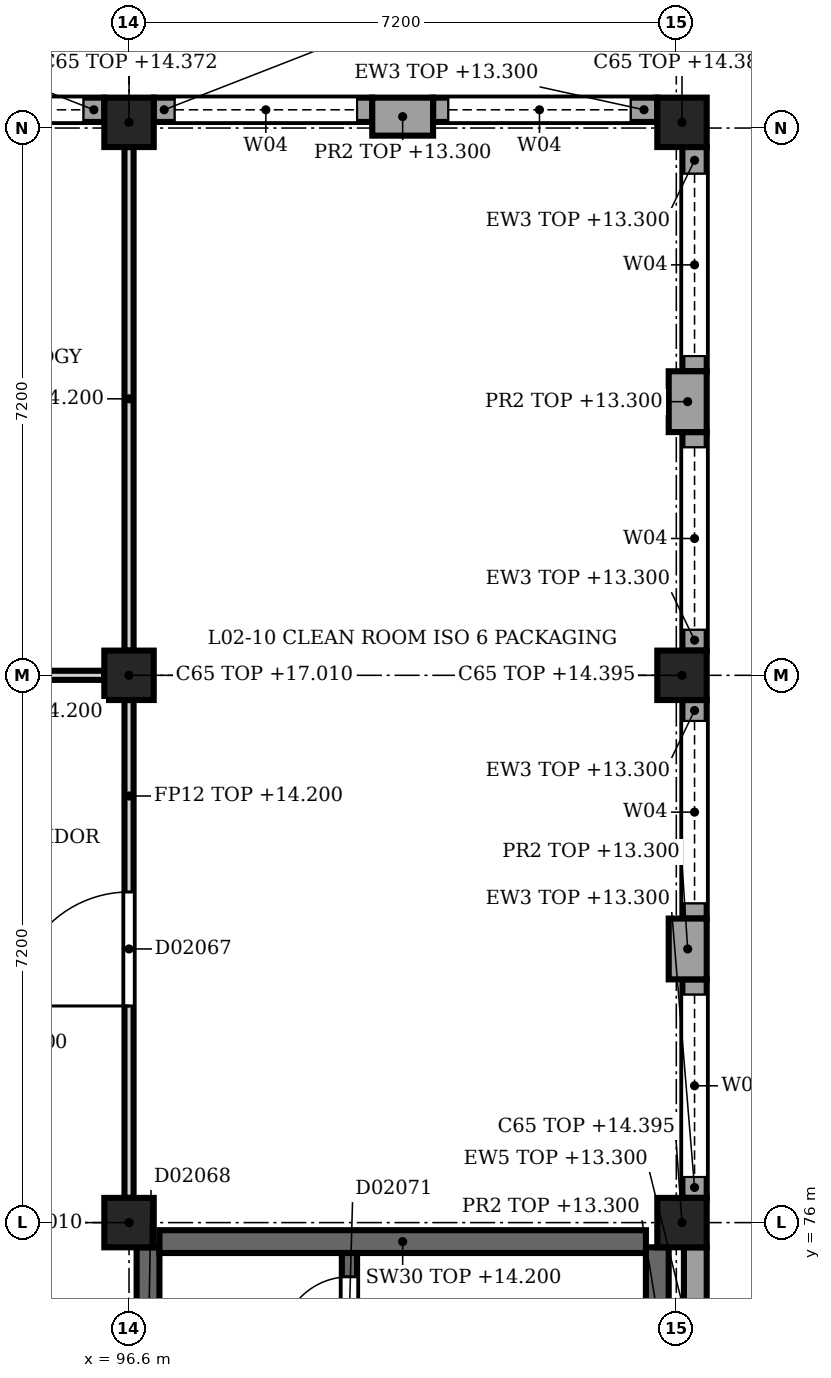
"""IFC4 building model, lengths in metres.
Left out: names, types, materials, properties, quantities, classifications, styles, units other than length and angle.
Written with IfcOpenShell. Run it as: python <this file> out.ifc"""

import sys

from ifc_helpers import new_model, si_unit, direction, frame, frame_2d, origin, origin_2d, place, context, subcontext, project, spatial, rectangle, extrude, element, fill, save


model = new_model("IFC4")
c1 = context("Model", 3, precision=1e-05, world=origin(), true_north=direction((0.0, 1.0)))
c2 = subcontext(c1, "Body", "Model", "MODEL_VIEW")
j1 = project(units=[si_unit("LENGTHUNIT", "METRE"), si_unit("PLANEANGLEUNIT", "RADIAN")], contexts=[c1])
p1 = place(None, origin())
s1 = spatial("IfcSite", under=j1, at=p1, CompositionType="ELEMENT")
p2 = place(p1, origin())
s2 = spatial("IfcBuilding", under=s1, at=p2, CompositionType="ELEMENT")
p3 = place(p2, frame((0.0, 0.0, 9.9)))
s3 = spatial("IfcBuildingStorey", under=s2, at=p3, CompositionType="ELEMENT", Elevation=9.9)
for number, where, z_axis, x_axis in (
    (1, (96.6, 76.0, 0.0), (0.0, 0.0, 1.0), (1.0, 0.0, 0.0)),
    (2, (96.6, 83.2, 0.0), (0.0, 0.0, 1.0), (1.0, 0.0, 0.0)),
):
    element("IfcColumn", number, at=place(p3, frame(where, z_axis=z_axis, x_axis=x_axis)), inside=s3, PredefinedType="COLUMN", context=c2, shape_type="SweptSolid", body=[
        extrude(rectangle(XDim=0.65, YDim=0.65, at=origin_2d()), origin(), (0.0, 0.0, 1.0), 7.11),
    ])
p4 = place(p3, frame((96.6, 90.475, 0.0), z_axis=(0.0, 0.0, 1.0), x_axis=(1.0, 0.0, 0.0)))
e3 = element("IfcColumn", 3, at=p4, inside=s3, PredefinedType="COLUMN", context=c2, shape_type="SweptSolid", body=[
    extrude(rectangle(XDim=0.65, YDim=0.65, at=origin_2d()), origin(), (0.0, 0.0, 1.0), 4.472),
])
for number, where, z_axis, x_axis in (
    (4, (103.875, 76.0, 0.0), (0.0, 0.0, 1.0), (1.0, 0.0, 0.0)),
    (5, (103.875, 83.2, 0.0), (0.0, 0.0, 1.0), (1.0, 0.0, 0.0)),
):
    element("IfcColumn", number, at=place(p3, frame(where, z_axis=z_axis, x_axis=x_axis)), inside=s3, PredefinedType="COLUMN", context=c2, shape_type="SweptSolid", body=[
        extrude(rectangle(XDim=0.65, YDim=0.65, at=origin_2d()), origin(), (0.0, 0.0, 1.0), 4.495),
    ])
p5 = place(p3, frame((103.875, 90.475, 0.0), z_axis=(0.0, 0.0, 1.0), x_axis=(1.0, 0.0, 0.0)))
e6 = element("IfcColumn", 6, at=p5, inside=s3, PredefinedType="COLUMN", context=c2, shape_type="SweptSolid", body=[
    extrude(rectangle(XDim=0.65, YDim=0.65, at=origin_2d()), origin(), (0.0, 0.0, 1.0), 4.49),
])
p6 = place(p3, frame((99.8, 90.55, 0.0), z_axis=(0.0, 0.0, 1.0), x_axis=(1.0, 0.0, 0.0)))
e7 = element("IfcWall", 7, at=p6, inside=s3, PredefinedType="SOLIDWALL", context=c2, shape_type="SweptSolid", body=[
    extrude(rectangle(XDim=0.8, YDim=0.5, at=frame_2d((0.4, 0.0))), origin(), (0.0, 0.0, 1.0), 3.4),
])
p7 = place(p3, frame((93.4, 90.64, 0.0), z_axis=(0.0, 0.0, 1.0), x_axis=(1.0, 0.0, 0.0)))
e8 = element("IfcWall", 8, at=p7, inside=s3, PredefinedType="SOLIDWALL", context=c2, shape_type="SweptSolid", body=[
    extrude(rectangle(XDim=2.875, YDim=0.32, at=frame_2d((1.438, 0.0))), origin(), (0.0, 0.0, 1.0), 3.4),
])
p8 = place(p7, frame((0.2, 0.0, 1.9)))
e9 = element("IfcOpeningElement", 9, at=p8, cuts=e8, PredefinedType="OPENING", context=c2, shape_type="SweptSolid", body=[
    extrude(rectangle(XDim=2.4, YDim=1.2, at=frame_2d((1.2, 0.6))), frame((0.0, 0.17, 0.0), z_axis=(0.0, -1.0, 0.0), x_axis=(1.0, 0.0, 0.0)), (0.0, 0.0, 1.0), 0.34),
])
p9 = place(p3, frame((96.925, 90.64, 0.0), z_axis=(0.0, 0.0, 1.0), x_axis=(1.0, 0.0, 0.0)))
e10 = element("IfcWall", 10, at=p9, inside=s3, PredefinedType="SOLIDWALL", context=c2, shape_type="SweptSolid", body=[
    extrude(rectangle(XDim=2.875, YDim=0.32, at=frame_2d((1.438, 0.0))), origin(), (0.0, 0.0, 1.0), 3.4),
])
p10 = place(p9, frame((0.275, 0.0, 1.9)))
e11 = element("IfcOpeningElement", 11, at=p10, cuts=e10, PredefinedType="OPENING", context=c2, shape_type="SweptSolid", body=[
    extrude(rectangle(XDim=2.4, YDim=1.2, at=frame_2d((1.2, 0.6))), frame((0.0, 0.17, 0.0), z_axis=(0.0, -1.0, 0.0), x_axis=(1.0, 0.0, 0.0)), (0.0, 0.0, 1.0), 0.34),
])
p11 = place(p3, frame((100.6, 90.64, 0.0), z_axis=(0.0, 0.0, 1.0), x_axis=(1.0, 0.0, 0.0)))
e12 = element("IfcWall", 12, at=p11, inside=s3, PredefinedType="SOLIDWALL", context=c2, shape_type="SweptSolid", body=[
    extrude(rectangle(XDim=2.95, YDim=0.32, at=frame_2d((1.475, 0.0))), origin(), (0.0, 0.0, 1.0), 3.4),
])
p12 = place(p11, frame((0.2, 0.0, 1.9)))
e13 = element("IfcOpeningElement", 13, at=p12, cuts=e12, PredefinedType="OPENING", context=c2, shape_type="SweptSolid", body=[
    extrude(rectangle(XDim=2.4, YDim=1.2, at=frame_2d((1.2, 0.6))), frame((0.0, 0.17, 0.0), z_axis=(0.0, -1.0, 0.0), x_axis=(1.0, 0.0, 0.0)), (0.0, 0.0, 1.0), 0.34),
])
for number, where, z_axis, x_axis in (
    (14, (103.95, 87.2, 0.0), (0.0, 0.0, 1.0), (0.0, -1.0, 0.0)),
    (15, (103.95, 80.0, 0.0), (0.0, 0.0, 1.0), (0.0, -1.0, 0.0)),
):
    element("IfcWall", number, at=place(p3, frame(where, z_axis=z_axis, x_axis=x_axis)), inside=s3, PredefinedType="SOLIDWALL", context=c2, shape_type="SweptSolid", body=[
        extrude(rectangle(XDim=0.8, YDim=0.5, at=frame_2d((0.4, 0.0))), origin(), (0.0, 0.0, 1.0), 3.4),
    ])
p13 = place(p3, frame((104.04, 90.15, 0.0), z_axis=(0.0, 0.0, 1.0), x_axis=(0.0, -1.0, 0.0)))
e16 = element("IfcWall", 16, at=p13, inside=s3, PredefinedType="SOLIDWALL", context=c2, shape_type="SweptSolid", body=[
    extrude(rectangle(XDim=2.95, YDim=0.32, at=frame_2d((1.475, 0.0))), origin(), (0.0, 0.0, 1.0), 3.4),
])
p14 = place(p13, frame((0.35, 0.0, 1.9)))
e17 = element("IfcOpeningElement", 17, at=p14, cuts=e16, PredefinedType="OPENING", context=c2, shape_type="SweptSolid", body=[
    extrude(rectangle(XDim=2.4, YDim=1.2, at=frame_2d((1.2, 0.6))), frame((0.0, 0.17, 0.0), z_axis=(0.0, -1.0, 0.0), x_axis=(1.0, 0.0, 0.0)), (0.0, 0.0, 1.0), 0.34),
])
p15 = place(p3, frame((104.04, 86.4, 0.0), z_axis=(0.0, 0.0, 1.0), x_axis=(0.0, -1.0, 0.0)))
e18 = element("IfcWall", 18, at=p15, inside=s3, PredefinedType="SOLIDWALL", context=c2, shape_type="SweptSolid", body=[
    extrude(rectangle(XDim=2.875, YDim=0.32, at=frame_2d((1.438, 0.0))), origin(), (0.0, 0.0, 1.0), 3.4),
])
p16 = place(p15, frame((0.2, 0.0, 1.9)))
e19 = element("IfcOpeningElement", 19, at=p16, cuts=e18, PredefinedType="OPENING", context=c2, shape_type="SweptSolid", body=[
    extrude(rectangle(XDim=2.4, YDim=1.2, at=frame_2d((1.2, 0.6))), frame((0.0, 0.17, 0.0), z_axis=(0.0, -1.0, 0.0), x_axis=(1.0, 0.0, 0.0)), (0.0, 0.0, 1.0), 0.34),
])
p17 = place(p3, frame((104.04, 82.875, 0.0), z_axis=(0.0, 0.0, 1.0), x_axis=(0.0, -1.0, 0.0)))
e20 = element("IfcWall", 20, at=p17, inside=s3, PredefinedType="SOLIDWALL", context=c2, shape_type="SweptSolid", body=[
    extrude(rectangle(XDim=2.875, YDim=0.32, at=frame_2d((1.438, 0.0))), origin(), (0.0, 0.0, 1.0), 3.4),
])
p18 = place(p17, frame((0.275, 0.0, 1.9)))
e21 = element("IfcOpeningElement", 21, at=p18, cuts=e20, PredefinedType="OPENING", context=c2, shape_type="SweptSolid", body=[
    extrude(rectangle(XDim=2.4, YDim=1.2, at=frame_2d((1.2, 0.6))), frame((0.0, 0.17, 0.0), z_axis=(0.0, -1.0, 0.0), x_axis=(1.0, 0.0, 0.0)), (0.0, 0.0, 1.0), 0.34),
])
p19 = place(p3, frame((104.04, 79.2, 0.0), z_axis=(0.0, 0.0, 1.0), x_axis=(0.0, -1.0, 0.0)))
e22 = element("IfcWall", 22, at=p19, inside=s3, PredefinedType="SOLIDWALL", context=c2, shape_type="SweptSolid", body=[
    extrude(rectangle(XDim=2.875, YDim=0.32, at=frame_2d((1.438, 0.0))), origin(), (0.0, 0.0, 1.0), 3.4),
])
p20 = place(p19, frame((0.2, 0.0, 1.9)))
e23 = element("IfcOpeningElement", 23, at=p20, cuts=e22, PredefinedType="OPENING", context=c2, shape_type="SweptSolid", body=[
    extrude(rectangle(XDim=2.4, YDim=1.2, at=frame_2d((1.2, 0.6))), frame((0.0, 0.17, 0.0), z_axis=(0.0, -1.0, 0.0), x_axis=(1.0, 0.0, 0.0)), (0.0, 0.0, 1.0), 0.34),
])
p21 = place(p3, frame((104.05, 75.675, 0.0), z_axis=(0.0, 0.0, 1.0), x_axis=(0.0, -1.0, 0.0)))
e24 = element("IfcWall", 24, at=p21, inside=s3, PredefinedType="SOLIDWALL", context=c2, shape_type="SweptSolid", body=[
    extrude(rectangle(XDim=2.875, YDim=0.3, at=frame_2d((1.438, 0.0))), origin(), (0.0, 0.0, 1.0), 3.4),
])
p22 = place(p3, frame((96.85, 75.675, 0.0), z_axis=(0.0, 0.0, 1.0), x_axis=(0.0, -1.0, 0.0)))
e25 = element("IfcWall", 25, at=p22, inside=s3, PredefinedType="SHEAR", context=c2, shape_type="SweptSolid", body=[
    extrude(rectangle(XDim=6.625, YDim=0.3, at=frame_2d((3.312, 0.0))), origin(), (0.0, 0.0, 1.0), 4.3),
])
p23 = place(p22, frame((1.075, 0.0, 0.0)))
e26 = element("IfcOpeningElement", 26, at=p23, cuts=e25, PredefinedType="OPENING", context=c2, shape_type="SweptSolid", body=[
    extrude(rectangle(XDim=1.2, YDim=2.1, at=frame_2d((0.6, 1.05))), frame((0.0, 0.16, 0.0), z_axis=(0.0, -1.0, 0.0), x_axis=(1.0, 0.0, 0.0)), (0.0, 0.0, 1.0), 0.32),
])
p24 = place(p3, frame((103.55, 69.05, 0.0), z_axis=(0.0, 0.0, 1.0), x_axis=(0.0, 1.0, 0.0)))
e27 = element("IfcWall", 27, at=p24, inside=s3, PredefinedType="SHEAR", context=c2, shape_type="SweptSolid", body=[
    extrude(rectangle(XDim=6.625, YDim=0.3, at=frame_2d((3.312, 0.0))), origin(), (0.0, 0.0, 1.0), 4.3),
])
p25 = place(p24, frame((1.25, 0.0, 1.2)))
e28 = element("IfcOpeningElement", 28, at=p25, cuts=e27, PredefinedType="OPENING", context=c2, shape_type="SweptSolid", body=[
    extrude(rectangle(XDim=0.6, YDim=1.8, at=frame_2d((0.3, 0.9))), frame((0.0, 0.16, 0.0), z_axis=(0.0, -1.0, 0.0), x_axis=(1.0, 0.0, 0.0)), (0.0, 0.0, 1.0), 0.32),
])
p26 = place(p3, frame((97.0, 75.75, 0.0), z_axis=(0.0, 0.0, 1.0), x_axis=(1.0, 0.0, 0.0)))
e29 = element("IfcWall", 29, at=p26, inside=s3, PredefinedType="SHEAR", context=c2, shape_type="SweptSolid", body=[
    extrude(rectangle(XDim=6.4, YDim=0.3, at=frame_2d((3.2, 0.0))), origin(), (0.0, 0.0, 1.0), 4.3),
])
p27 = place(p3, frame((99.5, 72.35, 0.0), z_axis=(0.0, 0.0, 1.0), x_axis=(0.0, 1.0, 0.0)))
e30 = element("IfcWall", 30, at=p27, inside=s3, PredefinedType="SHEAR", context=c2, shape_type="SweptSolid", body=[
    extrude(rectangle(XDim=3.25, YDim=0.2, at=frame_2d((1.625, 0.0))), origin(), (0.0, 0.0, 1.0), 4.3),
])
p28 = place(p27, frame((0.312, 0.0, 0.0)))
e31 = element("IfcOpeningElement", 31, at=p28, cuts=e30, PredefinedType="OPENING", context=c2, shape_type="SweptSolid", body=[
    extrude(rectangle(XDim=0.9, YDim=2.1, at=frame_2d((0.45, 1.05))), frame((0.0, 0.11, 0.0), z_axis=(0.0, -1.0, 0.0), x_axis=(1.0, 0.0, 0.0)), (0.0, 0.0, 1.0), 0.22),
])
p29 = place(p27, frame((2.038, 0.0, 0.0)))
e32 = element("IfcOpeningElement", 32, at=p29, cuts=e30, PredefinedType="OPENING", context=c2, shape_type="SweptSolid", body=[
    extrude(rectangle(XDim=0.9, YDim=2.1, at=frame_2d((0.45, 1.05))), frame((0.0, 0.11, 0.0), z_axis=(0.0, -1.0, 0.0), x_axis=(1.0, 0.0, 0.0)), (0.0, 0.0, 1.0), 0.22),
])
p30 = place(p3, frame((89.725, 83.2, 0.0), z_axis=(0.0, 0.0, 1.0), x_axis=(1.0, 0.0, 0.0)))
e33 = element("IfcWall", 33, at=p30, inside=s3, PredefinedType="PARTITIONING", context=c2, shape_type="SweptSolid", body=[
    extrude(rectangle(XDim=6.55, YDim=0.12, at=frame_2d((3.275, 0.0))), origin(), (0.0, 0.0, 1.0), 4.3),
])
p31 = place(p30, frame((2.525, 0.0, 0.0)))
e34 = element("IfcOpeningElement", 34, at=p31, cuts=e33, PredefinedType="OPENING", context=c2, shape_type="SweptSolid", body=[
    extrude(rectangle(XDim=1.5, YDim=2.2, at=frame_2d((0.75, 1.1))), frame((0.0, 0.07, 0.0), z_axis=(0.0, -1.0, 0.0), x_axis=(1.0, 0.0, 0.0)), (0.0, 0.0, 1.0), 0.14),
])
p32 = place(p3, frame((96.6, 82.875, 0.0), z_axis=(0.0, 0.0, 1.0), x_axis=(0.0, -1.0, 0.0)))
e35 = element("IfcWall", 35, at=p32, inside=s3, PredefinedType="PARTITIONING", context=c2, shape_type="SweptSolid", body=[
    extrude(rectangle(XDim=6.55, YDim=0.12, at=frame_2d((3.275, 0.0))), origin(), (0.0, 0.0, 1.0), 4.3),
])
p33 = place(p32, frame((2.525, 0.0, 0.0)))
e36 = element("IfcOpeningElement", 36, at=p33, cuts=e35, PredefinedType="OPENING", context=c2, shape_type="SweptSolid", body=[
    extrude(rectangle(XDim=1.5, YDim=2.2, at=frame_2d((0.75, 1.1))), frame((0.0, 0.07, 0.0), z_axis=(0.0, -1.0, 0.0), x_axis=(1.0, 0.0, 0.0)), (0.0, 0.0, 1.0), 0.14),
])
p34 = place(p3, frame((96.6, 83.525, 0.0), z_axis=(0.0, 0.0, 1.0), x_axis=(0.0, 1.0, 0.0)))
e37 = element("IfcWall", 37, at=p34, inside=s3, PredefinedType="PARTITIONING", context=c2, shape_type="SweptSolid", body=[
    extrude(rectangle(XDim=6.625, YDim=0.12, at=frame_2d((3.312, 0.0))), origin(), (0.0, 0.0, 1.0), 4.3),
])
p35 = place(p8, origin())
e38 = element("IfcWindow", 38, at=p35, inside=s3, PartitioningType="SINGLE_PANEL", PredefinedType="WINDOW", context=c2, shape_type="SweptSolid", body=[
    extrude(rectangle(XDim=2.4, YDim=1.2, at=frame_2d((1.2, 0.6))), frame((0.0, 0.03, 0.0), z_axis=(0.0, -1.0, 0.0), x_axis=(1.0, 0.0, 0.0)), (0.0, 0.0, 1.0), 0.06),
])
fill(e9, e38)
p36 = place(p10, origin())
e39 = element("IfcWindow", 39, at=p36, inside=s3, PartitioningType="SINGLE_PANEL", PredefinedType="WINDOW", context=c2, shape_type="SweptSolid", body=[
    extrude(rectangle(XDim=2.4, YDim=1.2, at=frame_2d((1.2, 0.6))), frame((0.0, 0.03, 0.0), z_axis=(0.0, -1.0, 0.0), x_axis=(1.0, 0.0, 0.0)), (0.0, 0.0, 1.0), 0.06),
])
fill(e11, e39)
p37 = place(p12, origin())
e40 = element("IfcWindow", 40, at=p37, inside=s3, PartitioningType="SINGLE_PANEL", PredefinedType="WINDOW", context=c2, shape_type="SweptSolid", body=[
    extrude(rectangle(XDim=2.4, YDim=1.2, at=frame_2d((1.2, 0.6))), frame((0.0, 0.03, 0.0), z_axis=(0.0, -1.0, 0.0), x_axis=(1.0, 0.0, 0.0)), (0.0, 0.0, 1.0), 0.06),
])
fill(e13, e40)
p38 = place(p14, origin())
e41 = element("IfcWindow", 41, at=p38, inside=s3, PartitioningType="SINGLE_PANEL", PredefinedType="WINDOW", context=c2, shape_type="SweptSolid", body=[
    extrude(rectangle(XDim=2.4, YDim=1.2, at=frame_2d((1.2, 0.6))), frame((0.0, 0.03, 0.0), z_axis=(0.0, -1.0, 0.0), x_axis=(1.0, 0.0, 0.0)), (0.0, 0.0, 1.0), 0.06),
])
fill(e17, e41)
p39 = place(p16, origin())
e42 = element("IfcWindow", 42, at=p39, inside=s3, PartitioningType="SINGLE_PANEL", PredefinedType="WINDOW", context=c2, shape_type="SweptSolid", body=[
    extrude(rectangle(XDim=2.4, YDim=1.2, at=frame_2d((1.2, 0.6))), frame((0.0, 0.03, 0.0), z_axis=(0.0, -1.0, 0.0), x_axis=(1.0, 0.0, 0.0)), (0.0, 0.0, 1.0), 0.06),
])
fill(e19, e42)
p40 = place(p18, origin())
e43 = element("IfcWindow", 43, at=p40, inside=s3, PartitioningType="SINGLE_PANEL", PredefinedType="WINDOW", context=c2, shape_type="SweptSolid", body=[
    extrude(rectangle(XDim=2.4, YDim=1.2, at=frame_2d((1.2, 0.6))), frame((0.0, 0.03, 0.0), z_axis=(0.0, -1.0, 0.0), x_axis=(1.0, 0.0, 0.0)), (0.0, 0.0, 1.0), 0.06),
])
fill(e21, e43)
p41 = place(p20, origin())
e44 = element("IfcWindow", 44, at=p41, inside=s3, PartitioningType="SINGLE_PANEL", PredefinedType="WINDOW", context=c2, shape_type="SweptSolid", body=[
    extrude(rectangle(XDim=2.4, YDim=1.2, at=frame_2d((1.2, 0.6))), frame((0.0, 0.03, 0.0), z_axis=(0.0, -1.0, 0.0), x_axis=(1.0, 0.0, 0.0)), (0.0, 0.0, 1.0), 0.06),
])
fill(e23, e44)
p42 = place(p29, origin())
e45 = element("IfcDoor", 45, at=p42, inside=s3, OperationType="SINGLE_SWING_RIGHT", PredefinedType="DOOR", context=c2, shape_type="SweptSolid", body=[
    extrude(rectangle(XDim=0.9, YDim=2.1, at=frame_2d((0.45, 1.05))), frame((0.0, 0.025, 0.0), z_axis=(0.0, -1.0, 0.0), x_axis=(1.0, 0.0, 0.0)), (0.0, 0.0, 1.0), 0.05),
])
fill(e32, e45)
p43 = place(p33, origin())
e46 = element("IfcDoor", 46, at=p43, inside=s3, OperationType="SINGLE_SWING_RIGHT", PredefinedType="DOOR", context=c2, shape_type="SweptSolid", body=[
    extrude(rectangle(XDim=1.5, YDim=2.2, at=frame_2d((0.75, 1.1))), frame((0.0, 0.025, 0.0), z_axis=(0.0, -1.0, 0.0), x_axis=(1.0, 0.0, 0.0)), (0.0, 0.0, 1.0), 0.05),
])
fill(e36, e46)
save(model, sys.argv[1])
